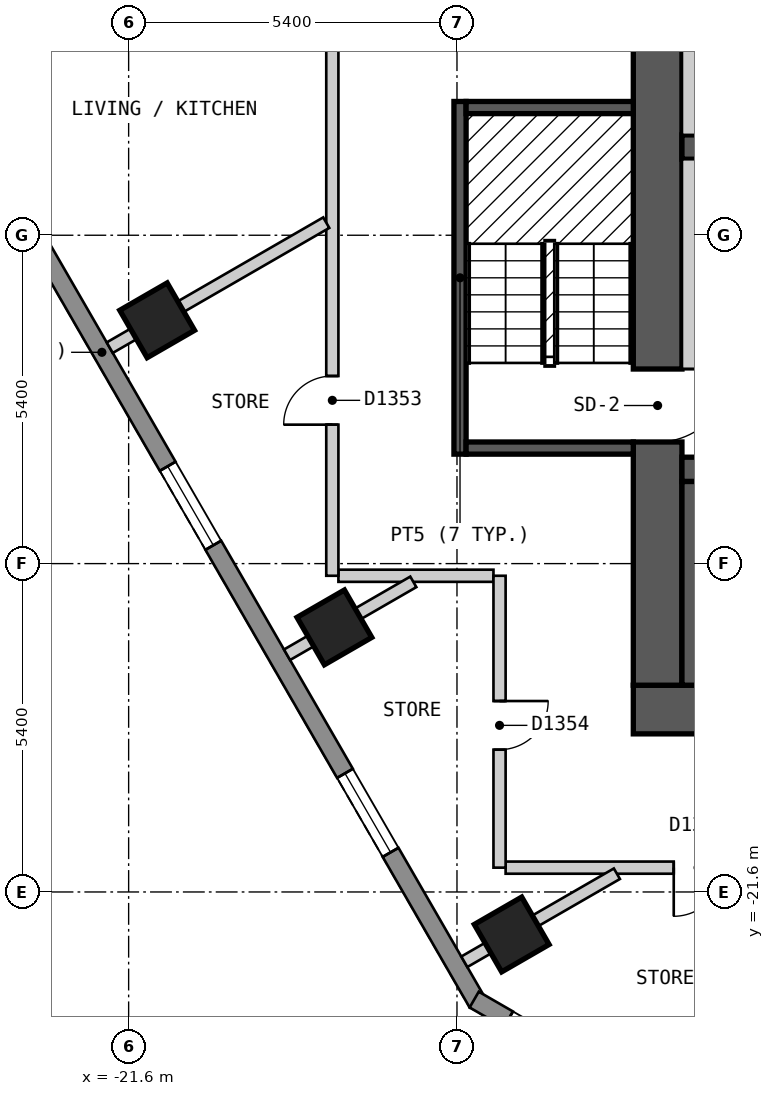
"""IFC4 building model, lengths in metres.
Left out: names, types, materials, properties, quantities, classifications, styles, units other than length and angle.
Written with IfcOpenShell. Run it as: python <this file> out.ifc"""

import sys

from ifc_helpers import new_model, si_unit, direction, frame, frame_2d, origin, origin_2d, place, context, subcontext, project, spatial, polyline, rectangle, outline, extrude, element, fill, save


model = new_model("IFC4")
c1 = context("Model", 3, precision=1e-05, world=origin(), true_north=direction((0.0, 1.0)))
c2 = subcontext(c1, "Body", "Model", "MODEL_VIEW")
j1 = project(units=[si_unit("LENGTHUNIT", "METRE"), si_unit("PLANEANGLEUNIT", "RADIAN")], contexts=[c1])
p1 = place(None, origin())
s1 = spatial("IfcSite", under=j1, at=p1, CompositionType="ELEMENT")
p2 = place(p1, origin())
s2 = spatial("IfcBuilding", under=s1, at=p2, CompositionType="ELEMENT")
p3 = place(p2, frame((0.0, 0.0, 147.6)))
s3 = spatial("IfcBuildingStorey", under=s2, at=p3, CompositionType="ELEMENT", Elevation=147.6)
for number, where, z_axis, x_axis in (
    (1, (-21.131, -12.199, 0.0), (0.0, 0.0, 1.0), (0.5, -0.866, 0.0)),
    (2, (-18.216, -17.249, 0.0), (0.0, 0.0, 1.0), (0.5, -0.866, 0.0)),
    (3, (-15.3, -22.299, 0.0), (0.0, 0.0, 1.0), (0.5, -0.866, 0.0)),
):
    element("IfcColumn", number, at=place(p3, frame(where, z_axis=z_axis, x_axis=x_axis)), inside=s3, PredefinedType="COLUMN", context=c2, shape_type="SweptSolid", body=[
        extrude(rectangle(XDim=0.9, YDim=0.9, at=origin_2d()), origin(), (0.0, 0.0, 1.0), 3.0),
    ])
p4 = place(p3, frame((-13.3, -18.6, 0.0), z_axis=(0.0, 0.0, 1.0), x_axis=(1.0, 0.0, 0.0)))
e4 = element("IfcWall", 4, at=p4, inside=s3, PredefinedType="SHEAR", context=c2, shape_type="SweptSolid", body=[
    extrude(rectangle(XDim=26.6, YDim=0.8, at=frame_2d((13.3, 0.0))), origin(), (0.0, 0.0, 1.0), 2.7),
])
p5 = place(p3, frame((-12.9, -18.2, 0.0), z_axis=(0.0, 0.0, 1.0), x_axis=(0.0, 1.0, 0.0)))
e5 = element("IfcWall", 5, at=p5, inside=s3, PredefinedType="SHEAR", context=c2, shape_type="SweptSolid", body=[
    extrude(rectangle(XDim=12.4, YDim=0.8, at=frame_2d((6.2, 0.0))), origin(), (0.0, 0.0, 1.0), 2.7),
])
p6 = place(p5, frame((4.0, 0.0, 0.0)))
e6 = element("IfcOpeningElement", 6, at=p6, cuts=e5, PredefinedType="OPENING", context=c2, shape_type="SweptSolid", body=[
    extrude(rectangle(XDim=1.2, YDim=2.1, at=frame_2d((0.6, 1.05))), frame((0.0, 0.41, 0.0), z_axis=(0.0, -1.0, 0.0), x_axis=(1.0, 0.0, 0.0)), (0.0, 0.0, 1.0), 0.82),
])
p7 = place(p3, frame((-12.5, -14.65, 0.0), z_axis=(0.0, 0.0, 1.0), x_axis=(1.0, 0.0, 0.0)))
e7 = element("IfcWall", 7, at=p7, inside=s3, PredefinedType="SHEAR", context=c2, shape_type="SweptSolid", body=[
    extrude(rectangle(XDim=25.0, YDim=0.4, at=frame_2d((12.5, 0.0))), origin(), (0.0, 0.0, 1.0), 2.7),
])
p8 = place(p7, frame((1.7, 0.0, 0.0), z_axis=(0.0, 0.0, 1.0), x_axis=(-1.0, 0.0, 0.0)))
e8 = element("IfcOpeningElement", 8, at=p8, cuts=e7, PredefinedType="OPENING", context=c2, shape_type="SweptSolid", body=[
    extrude(rectangle(XDim=1.2, YDim=2.1, at=frame_2d((0.6, 1.05))), frame((0.0, 0.21, 0.0), z_axis=(0.0, -1.0, 0.0), x_axis=(1.0, 0.0, 0.0)), (0.0, 0.0, 1.0), 0.42),
])
p9 = place(p7, frame((24.55, 0.0, 0.0), z_axis=(0.0, 0.0, 1.0), x_axis=(-1.0, 0.0, 0.0)))
e9 = element("IfcOpeningElement", 9, at=p9, cuts=e7, PredefinedType="OPENING", context=c2, shape_type="SweptSolid", body=[
    extrude(rectangle(XDim=1.2, YDim=2.1, at=frame_2d((0.6, 1.05))), frame((0.0, 0.21, 0.0), z_axis=(0.0, -1.0, 0.0), x_axis=(1.0, 0.0, 0.0)), (0.0, 0.0, 1.0), 0.42),
])
p10 = place(p7, frame((9.65, 0.0, 0.0), z_axis=(0.0, 0.0, 1.0), x_axis=(-1.0, 0.0, 0.0)))
e10 = element("IfcOpeningElement", 10, at=p10, cuts=e7, PredefinedType="OPENING", context=c2, shape_type="SweptSolid", body=[
    extrude(rectangle(XDim=1.0, YDim=2.1, at=frame_2d((0.5, 1.05))), frame((0.0, 0.21, 0.0), z_axis=(0.0, -1.0, 0.0), x_axis=(1.0, 0.0, 0.0)), (0.0, 0.0, 1.0), 0.42),
])
p11 = place(p7, frame((16.05, 0.0, 0.0), z_axis=(0.0, 0.0, 1.0), x_axis=(-1.0, 0.0, 0.0)))
e11 = element("IfcOpeningElement", 11, at=p11, cuts=e7, PredefinedType="OPENING", context=c2, shape_type="SweptSolid", body=[
    extrude(rectangle(XDim=1.0, YDim=2.1, at=frame_2d((0.5, 1.05))), frame((0.0, 0.21, 0.0), z_axis=(0.0, -1.0, 0.0), x_axis=(1.0, 0.0, 0.0)), (0.0, 0.0, 1.0), 0.42),
])
p12 = place(p3, frame((-12.5, -9.35, 0.0), z_axis=(0.0, 0.0, 1.0), x_axis=(1.0, 0.0, 0.0)))
e12 = element("IfcWall", 12, at=p12, inside=s3, PredefinedType="SHEAR", context=c2, shape_type="SweptSolid", body=[
    extrude(rectangle(XDim=22.7, YDim=0.4, at=frame_2d((11.35, 0.0))), origin(), (0.0, 0.0, 1.0), 2.7),
])
p13 = place(p12, frame((1.1, 0.0, 0.0)))
e13 = element("IfcOpeningElement", 13, at=p13, cuts=e12, PredefinedType="OPENING", context=c2, shape_type="SweptSolid", body=[
    extrude(rectangle(XDim=1.1, YDim=2.1, at=frame_2d((0.55, 1.05))), frame((0.0, 0.21, 0.0), z_axis=(0.0, -1.0, 0.0), x_axis=(1.0, 0.0, 0.0)), (0.0, 0.0, 1.0), 0.42),
])
p14 = place(p12, frame((3.9, 0.0, 0.0)))
e14 = element("IfcOpeningElement", 14, at=p14, cuts=e12, PredefinedType="OPENING", context=c2, shape_type="SweptSolid", body=[
    extrude(rectangle(XDim=1.1, YDim=2.1, at=frame_2d((0.55, 1.05))), frame((0.0, 0.21, 0.0), z_axis=(0.0, -1.0, 0.0), x_axis=(1.0, 0.0, 0.0)), (0.0, 0.0, 1.0), 0.42),
])
p15 = place(p12, frame((6.7, 0.0, 0.0)))
e15 = element("IfcOpeningElement", 15, at=p15, cuts=e12, PredefinedType="OPENING", context=c2, shape_type="SweptSolid", body=[
    extrude(rectangle(XDim=1.1, YDim=2.1, at=frame_2d((0.55, 1.05))), frame((0.0, 0.21, 0.0), z_axis=(0.0, -1.0, 0.0), x_axis=(1.0, 0.0, 0.0)), (0.0, 0.0, 1.0), 0.42),
])
p16 = place(p12, frame((9.0, 0.0, 0.0)))
e16 = element("IfcOpeningElement", 16, at=p16, cuts=e12, PredefinedType="OPENING", context=c2, shape_type="SweptSolid", body=[
    extrude(rectangle(XDim=1.1, YDim=2.1, at=frame_2d((0.55, 1.05))), frame((0.0, 0.21, 0.0), z_axis=(0.0, -1.0, 0.0), x_axis=(1.0, 0.0, 0.0)), (0.0, 0.0, 1.0), 0.42),
])
p17 = place(p12, frame((11.3, 0.0, 0.0)))
e17 = element("IfcOpeningElement", 17, at=p17, cuts=e12, PredefinedType="OPENING", context=c2, shape_type="SweptSolid", body=[
    extrude(rectangle(XDim=1.1, YDim=2.1, at=frame_2d((0.55, 1.05))), frame((0.0, 0.21, 0.0), z_axis=(0.0, -1.0, 0.0), x_axis=(1.0, 0.0, 0.0)), (0.0, 0.0, 1.0), 0.42),
])
p18 = place(p12, frame((13.6, 0.0, 0.0)))
e18 = element("IfcOpeningElement", 18, at=p18, cuts=e12, PredefinedType="OPENING", context=c2, shape_type="SweptSolid", body=[
    extrude(rectangle(XDim=1.1, YDim=2.1, at=frame_2d((0.55, 1.05))), frame((0.0, 0.21, 0.0), z_axis=(0.0, -1.0, 0.0), x_axis=(1.0, 0.0, 0.0)), (0.0, 0.0, 1.0), 0.42),
])
p19 = place(p12, frame((15.9, 0.0, 0.0)))
e19 = element("IfcOpeningElement", 19, at=p19, cuts=e12, PredefinedType="OPENING", context=c2, shape_type="SweptSolid", body=[
    extrude(rectangle(XDim=1.1, YDim=2.1, at=frame_2d((0.55, 1.05))), frame((0.0, 0.21, 0.0), z_axis=(0.0, -1.0, 0.0), x_axis=(1.0, 0.0, 0.0)), (0.0, 0.0, 1.0), 0.42),
])
p20 = place(p12, frame((18.2, 0.0, 0.0)))
e20 = element("IfcOpeningElement", 20, at=p20, cuts=e12, PredefinedType="OPENING", context=c2, shape_type="SweptSolid", body=[
    extrude(rectangle(XDim=1.1, YDim=2.1, at=frame_2d((0.55, 1.05))), frame((0.0, 0.21, 0.0), z_axis=(0.0, -1.0, 0.0), x_axis=(1.0, 0.0, 0.0)), (0.0, 0.0, 1.0), 0.42),
])
p21 = place(p12, frame((20.6, 0.0, 0.0)))
e21 = element("IfcOpeningElement", 21, at=p21, cuts=e12, PredefinedType="OPENING", context=c2, shape_type="SweptSolid", body=[
    extrude(rectangle(XDim=1.1, YDim=2.1, at=frame_2d((0.55, 1.05))), frame((0.0, 0.21, 0.0), z_axis=(0.0, -1.0, 0.0), x_axis=(1.0, 0.0, 0.0)), (0.0, 0.0, 1.0), 0.42),
])
p22 = place(p3, frame((-28.218, -2.025, 0.0), z_axis=(0.0, 0.0, 1.0), x_axis=(0.500017503135, -0.866015298109, 0.0)))
e22 = element("IfcWall", 22, at=p22, inside=s3, PredefinedType="SOLIDWALL", context=c2, shape_type="SweptSolid", body=[
    extrude(outline(polyline([(0.0, -0.15), (24.711, -0.15), (24.631, 0.15), (0.08, 0.15), (0.0, -0.15)])), origin(), (0.0, 0.0, 1.0), 2.7),
])
p23 = place(p22, frame((2.857, 0.0, 0.15)))
e23 = element("IfcOpeningElement", 23, at=p23, cuts=e22, PredefinedType="OPENING", context=c2, shape_type="SweptSolid", body=[
    extrude(rectangle(XDim=1.5, YDim=2.1, at=frame_2d((0.75, 1.05))), frame((0.0, 0.16, 0.0), z_axis=(0.0, -1.0, 0.0), x_axis=(1.0, 0.0, 0.0)), (0.0, 0.0, 1.0), 0.32),
])
p24 = place(p22, frame((8.689, 0.0, 0.15)))
e24 = element("IfcOpeningElement", 24, at=p24, cuts=e22, PredefinedType="OPENING", context=c2, shape_type="SweptSolid", body=[
    extrude(rectangle(XDim=1.5, YDim=2.1, at=frame_2d((0.75, 1.05))), frame((0.0, 0.16, 0.0), z_axis=(0.0, -1.0, 0.0), x_axis=(1.0, 0.0, 0.0)), (0.0, 0.0, 1.0), 0.32),
])
p25 = place(p22, frame((14.52, 0.0, 0.15)))
e25 = element("IfcOpeningElement", 25, at=p25, cuts=e22, PredefinedType="OPENING", context=c2, shape_type="SweptSolid", body=[
    extrude(rectangle(XDim=1.5, YDim=2.1, at=frame_2d((0.75, 1.05))), frame((0.0, 0.16, 0.0), z_axis=(0.0, -1.0, 0.0), x_axis=(1.0, 0.0, 0.0)), (0.0, 0.0, 1.0), 0.32),
])
p26 = place(p22, frame((20.351, 0.0, 0.15)))
e26 = element("IfcOpeningElement", 26, at=p26, cuts=e22, PredefinedType="OPENING", context=c2, shape_type="SweptSolid", body=[
    extrude(rectangle(XDim=1.5, YDim=2.1, at=frame_2d((0.75, 1.05))), frame((0.0, 0.16, 0.0), z_axis=(0.0, -1.0, 0.0), x_axis=(1.0, 0.0, 0.0)), (0.0, 0.0, 1.0), 0.32),
])
p27 = place(p3, frame((-15.917, -23.37, 0.0), z_axis=(0.0, 0.0, 1.0), x_axis=(0.866022959057, -0.500004234368, 0.0)))
e27 = element("IfcWall", 27, at=p27, inside=s3, PredefinedType="SOLIDWALL", context=c2, shape_type="SweptSolid", body=[
    extrude(outline(polyline([(0.0, -0.15), (5.0, -0.15), (4.92, 0.15), (0.08, 0.15), (0.0, -0.15)])), origin(), (0.0, 0.0, 1.0), 2.7),
])
p28 = place(p27, frame((0.65, 0.0, 0.15)))
e28 = element("IfcOpeningElement", 28, at=p28, cuts=e27, PredefinedType="OPENING", context=c2, shape_type="SweptSolid", body=[
    extrude(rectangle(XDim=1.2, YDim=2.1, at=frame_2d((0.6, 1.05))), frame((0.0, 0.16, 0.0), z_axis=(0.0, -1.0, 0.0), x_axis=(1.0, 0.0, 0.0)), (0.0, 0.0, 1.0), 0.32),
])
p29 = place(p3, frame((-18.15, -16.4, 0.0), z_axis=(0.0, 0.0, 1.0), x_axis=(1.0, 0.0, 0.0)))
e29 = element("IfcWall", 29, at=p29, inside=s3, PredefinedType="PARTITIONING", context=c2, shape_type="SweptSolid", body=[
    extrude(rectangle(XDim=2.55, YDim=0.2, at=frame_2d((1.275, 0.0))), origin(), (0.0, 0.0, 1.0), 2.7),
])
p30 = place(p3, frame((-15.4, -21.2, 0.0), z_axis=(0.0, 0.0, 1.0), x_axis=(1.0, 0.0, 0.0)))
e30 = element("IfcWall", 30, at=p30, inside=s3, PredefinedType="PARTITIONING", context=c2, shape_type="SweptSolid", body=[
    extrude(rectangle(XDim=30.799, YDim=0.2, at=frame_2d((15.399, 0.0))), origin(), (0.0, 0.0, 1.0), 2.7),
])
p31 = place(p30, frame((17.643, 0.0, 0.0)))
e31 = element("IfcOpeningElement", 31, at=p31, cuts=e30, PredefinedType="OPENING", context=c2, shape_type="SweptSolid", body=[
    extrude(rectangle(XDim=1.0, YDim=2.1, at=frame_2d((0.5, 1.05))), frame((0.0, 0.11, 0.0), z_axis=(0.0, -1.0, 0.0), x_axis=(1.0, 0.0, 0.0)), (0.0, 0.0, 1.0), 0.22),
])
p32 = place(p30, frame((2.765, 0.0, 0.0)))
e32 = element("IfcOpeningElement", 32, at=p32, cuts=e30, PredefinedType="OPENING", context=c2, shape_type="SweptSolid", body=[
    extrude(rectangle(XDim=0.8, YDim=2.1, at=frame_2d((0.4, 1.05))), frame((0.0, 0.11, 0.0), z_axis=(0.0, -1.0, 0.0), x_axis=(1.0, 0.0, 0.0)), (0.0, 0.0, 1.0), 0.22),
])
p33 = place(p3, frame((-15.5, -21.2, 0.0), z_axis=(0.0, 0.0, 1.0), x_axis=(0.0, 1.0, 0.0)))
e33 = element("IfcWall", 33, at=p33, inside=s3, PredefinedType="PARTITIONING", context=c2, shape_type="SweptSolid", body=[
    extrude(rectangle(XDim=4.8, YDim=0.2, at=frame_2d((2.4, 0.0))), origin(), (0.0, 0.0, 1.0), 2.7),
])
p34 = place(p33, frame((1.94, 0.0, 0.0)))
e34 = element("IfcOpeningElement", 34, at=p34, cuts=e33, PredefinedType="OPENING", context=c2, shape_type="SweptSolid", body=[
    extrude(rectangle(XDim=0.8, YDim=2.1, at=frame_2d((0.4, 1.05))), frame((0.0, 0.11, 0.0), z_axis=(0.0, -1.0, 0.0), x_axis=(1.0, 0.0, 0.0)), (0.0, 0.0, 1.0), 0.22),
])
p35 = place(p3, frame((-18.25, -16.4, 0.0), z_axis=(0.0, 0.0, 1.0), x_axis=(0.0, 1.0, 0.0)))
e35 = element("IfcWall", 35, at=p35, inside=s3, PredefinedType="PARTITIONING", context=c2, shape_type="SweptSolid", body=[
    extrude(rectangle(XDim=9.799, YDim=0.2, at=frame_2d((4.899, 0.0))), origin(), (0.0, 0.0, 1.0), 2.7),
])
p36 = place(p35, frame((2.485, 0.0, 0.0)))
e36 = element("IfcOpeningElement", 36, at=p36, cuts=e35, PredefinedType="OPENING", context=c2, shape_type="SweptSolid", body=[
    extrude(rectangle(XDim=0.8, YDim=2.1, at=frame_2d((0.4, 1.05))), frame((0.0, 0.11, 0.0), z_axis=(0.0, -1.0, 0.0), x_axis=(1.0, 0.0, 0.0)), (0.0, 0.0, 1.0), 0.22),
])
p37 = place(p3, frame((-18.995, -17.699, 0.0), z_axis=(0.0, 0.0, 1.0), x_axis=(0.86607371389, 0.499916315105, 0.0)))
e37 = element("IfcWall", 37, at=p37, inside=s3, PredefinedType="PARTITIONING", context=c2, shape_type="SweptSolid", body=[
    extrude(rectangle(XDim=2.398, YDim=0.2, at=frame_2d((1.199, 0.0))), origin(), (0.0, 0.0, 1.0), 2.7),
])
p38 = place(p3, frame((-16.079, -22.748, 0.0), z_axis=(0.0, 0.0, 1.0), x_axis=(0.866114021284, 0.499846478567, 0.0)))
e38 = element("IfcWall", 38, at=p38, inside=s3, PredefinedType="PARTITIONING", context=c2, shape_type="SweptSolid", body=[
    extrude(rectangle(XDim=2.897, YDim=0.2, at=frame_2d((1.448, 0.0))), origin(), (0.0, 0.0, 1.0), 2.7),
])
p39 = place(p3, frame((-21.911, -12.649, 0.0), z_axis=(0.0, 0.0, 1.0), x_axis=(0.866016499285, 0.500015422728, 0.0)))
e39 = element("IfcWall", 39, at=p39, inside=s3, PredefinedType="PARTITIONING", context=c2, shape_type="SweptSolid", body=[
    extrude(rectangle(XDim=4.112, YDim=0.2, at=frame_2d((2.056, 0.0))), origin(), (0.0, 0.0, 1.0), 2.7),
])
p40 = place(p3, frame((-16.15, -14.4, 0.0), z_axis=(0.0, 0.0, 1.0), x_axis=(0.0, 1.0, 0.0)))
e40 = element("IfcWall", 40, at=p40, inside=s3, PredefinedType="SOLIDWALL", context=c2, shape_type="SweptSolid", body=[
    extrude(rectangle(XDim=5.8, YDim=0.2, at=frame_2d((2.9, 0.0))), origin(), (0.0, 0.0, 1.0), 2.7),
])
for number, where, z_axis, x_axis in (
    (41, (-16.05, -14.3, 0.0), (0.0, 0.0, 1.0), (1.0, 0.0, 0.0)),
    (42, (-16.05, -8.7, 0.0), (0.0, 0.0, 1.0), (1.0, 0.0, 0.0)),
):
    element("IfcWall", number, at=place(p3, frame(where, z_axis=z_axis, x_axis=x_axis)), inside=s3, PredefinedType="SOLIDWALL", context=c2, shape_type="SweptSolid", body=[
        extrude(rectangle(XDim=2.75, YDim=0.2, at=frame_2d((1.375, 0.0))), origin(), (0.0, 0.0, 1.0), 2.7),
    ])
p41 = place(p3, frame((-12.3, -18.2, 0.0), z_axis=(0.0, 0.0, 1.0), x_axis=(0.0, 1.0, 0.0)))
e43 = element("IfcWall", 43, at=p41, inside=s3, PredefinedType="SOLIDWALL", context=c2, shape_type="SweptSolid", body=[
    extrude(rectangle(XDim=3.35, YDim=0.4, at=frame_2d((1.675, 0.0))), origin(), (0.0, 0.0, 1.0), 2.7),
])
p42 = place(p3, frame((-12.3, -13.0, 0.0), z_axis=(0.0, 0.0, 1.0), x_axis=(0.0, 1.0, 0.0)))
e44 = element("IfcWall", 44, at=p42, inside=s3, PredefinedType="PARTITIONING", context=c2, shape_type="SweptSolid", body=[
    extrude(rectangle(XDim=3.45, YDim=0.4, at=frame_2d((1.725, 0.0))), origin(), (0.0, 0.0, 1.0), 2.7),
])
p43 = place(p3, frame((-12.3, -9.15, 0.0), z_axis=(0.0, 0.0, 1.0), x_axis=(0.0, 1.0, 0.0)))
e45 = element("IfcWall", 45, at=p43, inside=s3, PredefinedType="SOLIDWALL", context=c2, shape_type="SweptSolid", body=[
    extrude(rectangle(XDim=3.35, YDim=0.4, at=frame_2d((1.675, 0.0))), origin(), (0.0, 0.0, 1.0), 2.7),
])
p44 = place(p25, origin())
e46 = element("IfcWindow", 46, at=p44, inside=s3, PartitioningType="SINGLE_PANEL", PredefinedType="WINDOW", context=c2, shape_type="SweptSolid", body=[
    extrude(rectangle(XDim=1.5, YDim=2.1, at=frame_2d((0.75, 1.05))), frame((0.0, 0.03, 0.0), z_axis=(0.0, -1.0, 0.0), x_axis=(1.0, 0.0, 0.0)), (0.0, 0.0, 1.0), 0.06),
])
fill(e25, e46)
p45 = place(p26, origin())
e47 = element("IfcWindow", 47, at=p45, inside=s3, PartitioningType="SINGLE_PANEL", PredefinedType="WINDOW", context=c2, shape_type="SweptSolid", body=[
    extrude(rectangle(XDim=1.5, YDim=2.1, at=frame_2d((0.75, 1.05))), frame((0.0, 0.03, 0.0), z_axis=(0.0, -1.0, 0.0), x_axis=(1.0, 0.0, 0.0)), (0.0, 0.0, 1.0), 0.06),
])
fill(e26, e47)
p46 = place(p36, origin())
e48 = element("IfcDoor", 48, at=p46, inside=s3, OperationType="SINGLE_SWING_LEFT", PredefinedType="DOOR", context=c2, shape_type="SweptSolid", body=[
    extrude(rectangle(XDim=0.8, YDim=2.1, at=frame_2d((0.4, 1.05))), frame((0.0, 0.025, 0.0), z_axis=(0.0, -1.0, 0.0), x_axis=(1.0, 0.0, 0.0)), (0.0, 0.0, 1.0), 0.05),
])
fill(e36, e48)
p47 = place(p34, origin())
e49 = element("IfcDoor", 49, at=p47, inside=s3, OperationType="SINGLE_SWING_RIGHT", PredefinedType="DOOR", context=c2, shape_type="SweptSolid", body=[
    extrude(rectangle(XDim=0.8, YDim=2.1, at=frame_2d((0.4, 1.05))), frame((0.0, 0.025, 0.0), z_axis=(0.0, -1.0, 0.0), x_axis=(1.0, 0.0, 0.0)), (0.0, 0.0, 1.0), 0.05),
])
fill(e34, e49)
p48 = place(p32, origin())
e50 = element("IfcDoor", 50, at=p48, inside=s3, OperationType="SINGLE_SWING_LEFT", PredefinedType="DOOR", context=c2, shape_type="SweptSolid", body=[
    extrude(rectangle(XDim=0.8, YDim=2.1, at=frame_2d((0.4, 1.05))), frame((0.0, 0.025, 0.0), z_axis=(0.0, -1.0, 0.0), x_axis=(1.0, 0.0, 0.0)), (0.0, 0.0, 1.0), 0.05),
])
fill(e32, e50)
p49 = place(p6, origin())
e51 = element("IfcDoor", 51, at=p49, inside=s3, OperationType="SINGLE_SWING_RIGHT", PredefinedType="DOOR", context=c2, shape_type="SweptSolid", body=[
    extrude(rectangle(XDim=1.2, YDim=2.1, at=frame_2d((0.6, 1.05))), frame((0.0, 0.025, 0.0), z_axis=(0.0, -1.0, 0.0), x_axis=(1.0, 0.0, 0.0)), (0.0, 0.0, 1.0), 0.05),
])
fill(e6, e51)
save(model, sys.argv[1])
